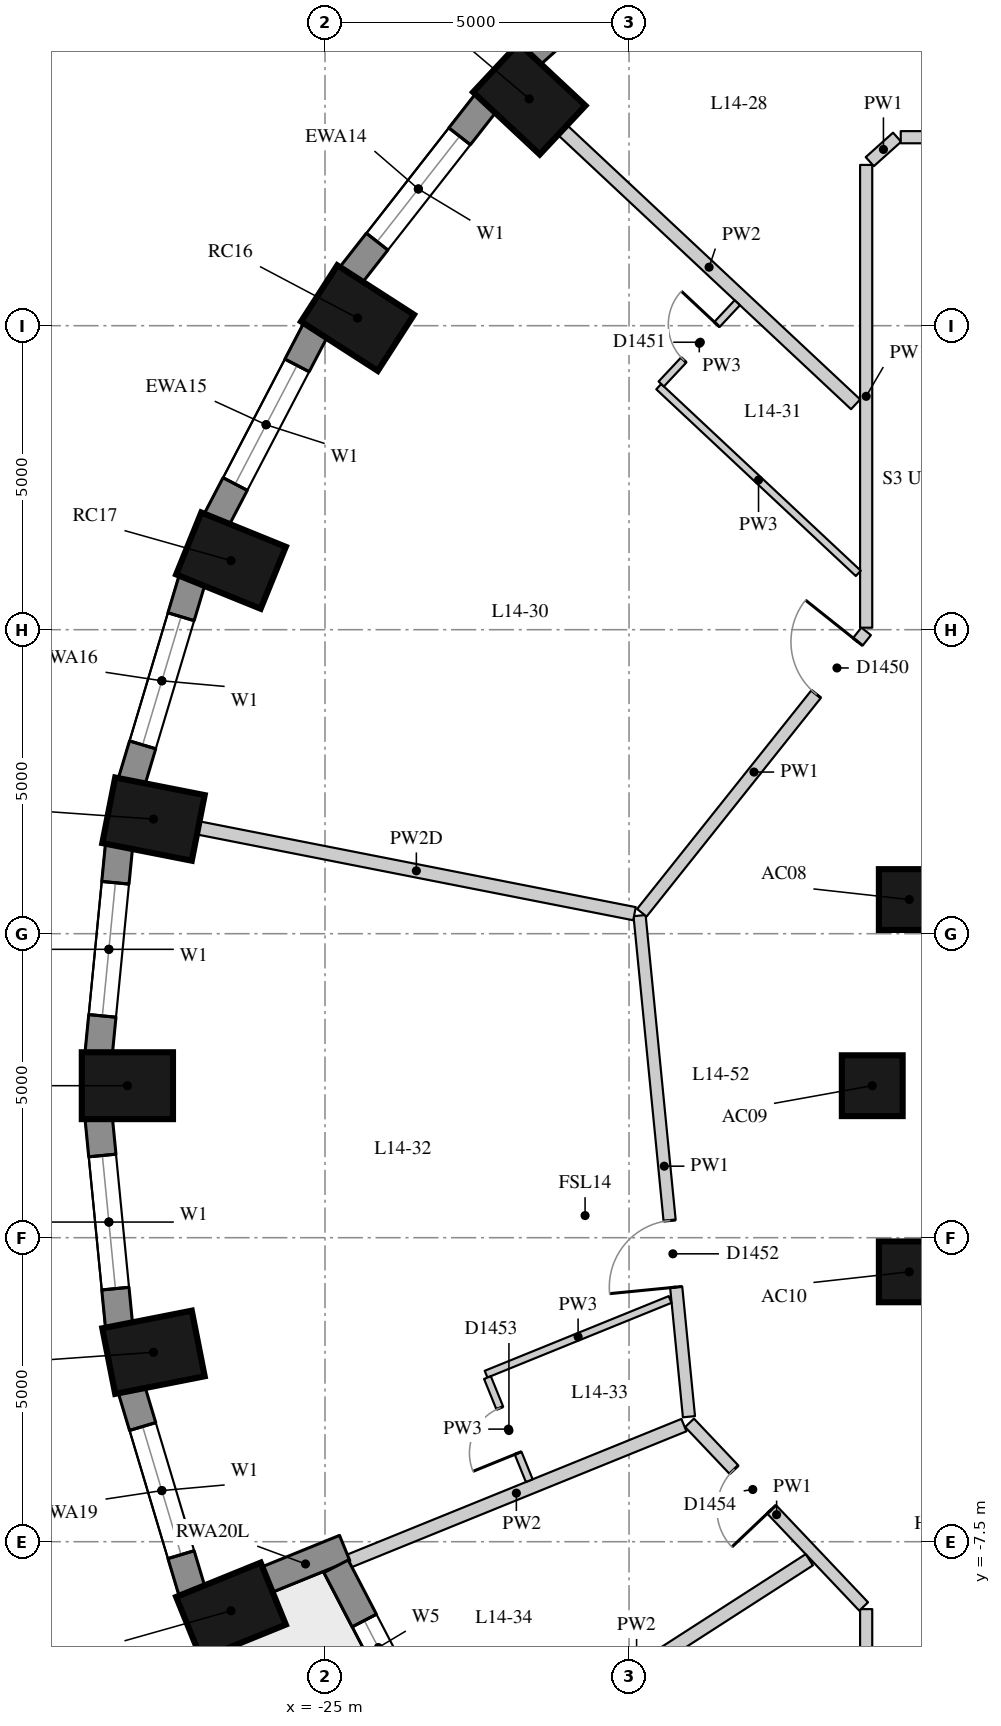
"""IFC4 building model, lengths in metres.
Left out: names, types, materials, properties, quantities, classifications, styles, units other than length and angle.
Written with IfcOpenShell. Run it as: python <this file> out.ifc"""

import sys

from ifc_helpers import new_model, si_unit, direction, frame, frame_2d, origin, origin_2d, place, context, subcontext, project, spatial, rectangle, extrude, element, fill, save


model = new_model("IFC4")
c1 = context("Model", 3, precision=1e-05, world=origin(), true_north=direction((0.0, 1.0)))
c2 = subcontext(c1, "Body", "Model", "MODEL_VIEW")
j1 = project(units=[si_unit("LENGTHUNIT", "METRE"), si_unit("PLANEANGLEUNIT", "RADIAN")], contexts=[c1])
p1 = place(None, origin())
s1 = spatial("IfcSite", under=j1, at=p1, CompositionType="ELEMENT")
p2 = place(p1, origin())
s2 = spatial("IfcBuilding", under=s1, at=p2, CompositionType="ELEMENT")
p3 = place(p2, frame((0.0, 0.0, 54.7)))
s3 = spatial("IfcBuildingStorey", under=s2, at=p3, CompositionType="ELEMENT", Elevation=54.7)
for number, where, z_axis, x_axis in (
    (1, (-21.641, 16.23, 0.0), (0.0, 0.0, 1.0), (-0.73, 0.683, 0.0)),
    (2, (-24.465, 12.625, 0.0), (0.0, 0.0, 1.0), (-0.841, 0.541, 0.0)),
    (3, (-26.546, 8.636, 0.0), (0.0, 0.0, 1.0), (-0.927, 0.376, 0.0)),
    (4, (-27.821, 4.385, 0.0), (0.0, 0.0, 1.0), (-0.981, 0.193, 0.0)),
    (5, (-28.25, 0.0, 0.0), (0.0, 0.0, 1.0), (-1.0, 0.0, 0.0)),
    (6, (-27.821, -4.385, 0.0), (0.0, 0.0, 1.0), (-0.981, -0.193, 0.0)),
    (7, (-26.546, -8.636, 0.0), (0.0, 0.0, 1.0), (-0.927, -0.376, 0.0)),
):
    element("IfcColumn", number, at=place(p3, frame(where, z_axis=z_axis, x_axis=x_axis)), inside=s3, PredefinedType="COLUMN", context=c2, shape_type="SweptSolid", body=[
        extrude(rectangle(XDim=1.5, YDim=1.1, at=origin_2d()), origin(), (0.0, 0.0, 1.0), 3.3),
    ])
for number, where, z_axis, x_axis in (
    (8, (-15.391, 3.062, 0.0), (0.0, 0.0, 1.0), (1.0, 0.0, 0.0)),
    (9, (-16.0, 0.0, 0.0), (0.0, 0.0, 1.0), (1.0, 0.0, 0.0)),
    (10, (-15.391, -3.062, 0.0), (0.0, 0.0, 1.0), (1.0, 0.0, 0.0)),
):
    element("IfcColumn", number, at=place(p3, frame(where, z_axis=z_axis, x_axis=x_axis)), inside=s3, PredefinedType="COLUMN", context=c2, shape_type="SweptSolid", body=[
        extrude(rectangle(XDim=1.0, YDim=1.0, at=origin_2d()), origin(), (0.0, 0.0, 1.0), 3.3),
    ])
p4 = place(p3, frame((-18.871, 19.407, 0.0), z_axis=(0.0, 0.0, 1.0), x_axis=(-0.745526233716, -0.66647628228, 0.0)))
e11 = element("IfcWall", 11, at=p4, inside=s3, PredefinedType="SOLIDWALL", context=c2, shape_type="SweptSolid", body=[
    extrude(rectangle(XDim=3.697, YDim=0.45, at=frame_2d((1.848, 0.0))), origin(), (0.0, 0.0, 1.0), 3.02),
])
p5 = place(p4, frame((0.749, 0.0, 0.4)))
e12 = element("IfcOpeningElement", 12, at=p5, cuts=e11, PredefinedType="OPENING", context=c2, shape_type="SweptSolid", body=[
    extrude(rectangle(XDim=2.2, YDim=1.75, at=frame_2d((1.1, 0.875))), frame((0.0, 0.235, 0.0), z_axis=(0.0, -1.0, 0.0), x_axis=(1.0, 0.0, 0.0)), (0.0, 0.0, 1.0), 0.47),
])
p6 = place(p3, frame((-22.352, 16.17, 0.0), z_axis=(0.0, 0.0, 1.0), x_axis=(-0.616661975264, -0.787228053529, 0.0)))
e13 = element("IfcWall", 13, at=p6, inside=s3, PredefinedType="SOLIDWALL", context=c2, shape_type="SweptSolid", body=[
    extrude(rectangle(XDim=3.61, YDim=0.45, at=frame_2d((1.805, 0.0))), origin(), (0.0, 0.0, 1.0), 3.02),
])
p7 = place(p6, frame((0.705, 0.0, 0.4)))
e14 = element("IfcOpeningElement", 14, at=p7, cuts=e13, PredefinedType="OPENING", context=c2, shape_type="SweptSolid", body=[
    extrude(rectangle(XDim=2.2, YDim=1.75, at=frame_2d((1.1, 0.875))), frame((0.0, 0.235, 0.0), z_axis=(0.0, -1.0, 0.0), x_axis=(1.0, 0.0, 0.0)), (0.0, 0.0, 1.0), 0.47),
])
p8 = place(p3, frame((-25.152, 12.437, 0.0), z_axis=(0.0, 0.0, 1.0), x_axis=(-0.462492775226, -0.886623050041, 0.0)))
e15 = element("IfcWall", 15, at=p8, inside=s3, PredefinedType="SOLIDWALL", context=c2, shape_type="SweptSolid", body=[
    extrude(rectangle(XDim=3.532, YDim=0.45, at=frame_2d((1.766, 0.0))), origin(), (0.0, 0.0, 1.0), 3.02),
])
p9 = place(p8, frame((0.666, 0.0, 0.4)))
e16 = element("IfcOpeningElement", 16, at=p9, cuts=e15, PredefinedType="OPENING", context=c2, shape_type="SweptSolid", body=[
    extrude(rectangle(XDim=2.2, YDim=1.75, at=frame_2d((1.1, 0.875))), frame((0.0, 0.235, 0.0), z_axis=(0.0, -1.0, 0.0), x_axis=(1.0, 0.0, 0.0)), (0.0, 0.0, 1.0), 0.47),
])
p10 = place(p3, frame((-27.185, 8.323, 0.0), z_axis=(0.0, 0.0, 1.0), x_axis=(-0.287064133733, -0.957911364963, 0.0)))
e17 = element("IfcWall", 17, at=p10, inside=s3, PredefinedType="SOLIDWALL", context=c2, shape_type="SweptSolid", body=[
    extrude(rectangle(XDim=3.473, YDim=0.45, at=frame_2d((1.737, 0.0))), origin(), (0.0, 0.0, 1.0), 3.02),
])
p11 = place(p10, frame((0.637, 0.0, 0.4)))
e18 = element("IfcOpeningElement", 18, at=p11, cuts=e17, PredefinedType="OPENING", context=c2, shape_type="SweptSolid", body=[
    extrude(rectangle(XDim=2.2, YDim=1.75, at=frame_2d((1.1, 0.875))), frame((0.0, 0.235, 0.0), z_axis=(0.0, -1.0, 0.0), x_axis=(1.0, 0.0, 0.0)), (0.0, 0.0, 1.0), 0.47),
])
p12 = place(p3, frame((-28.387, 3.956, 0.0), z_axis=(0.0, 0.0, 1.0), x_axis=(-0.097389581596, -0.995246336038, 0.0)))
e19 = element("IfcWall", 19, at=p12, inside=s3, PredefinedType="SOLIDWALL", context=c2, shape_type="SweptSolid", body=[
    extrude(rectangle(XDim=3.442, YDim=0.45, at=frame_2d((1.721, 0.0))), origin(), (0.0, 0.0, 1.0), 3.02),
])
p13 = place(p12, frame((0.621, 0.0, 0.4)))
e20 = element("IfcOpeningElement", 20, at=p13, cuts=e19, PredefinedType="OPENING", context=c2, shape_type="SweptSolid", body=[
    extrude(rectangle(XDim=2.2, YDim=1.75, at=frame_2d((1.1, 0.875))), frame((0.0, 0.235, 0.0), z_axis=(0.0, -1.0, 0.0), x_axis=(1.0, 0.0, 0.0)), (0.0, 0.0, 1.0), 0.47),
])
p14 = place(p3, frame((-28.722, -0.53, 0.0), z_axis=(0.0, 0.0, 1.0), x_axis=(0.097389581596, -0.995246336038, 0.0)))
e21 = element("IfcWall", 21, at=p14, inside=s3, PredefinedType="SOLIDWALL", context=c2, shape_type="SweptSolid", body=[
    extrude(rectangle(XDim=3.442, YDim=0.45, at=frame_2d((1.721, 0.0))), origin(), (0.0, 0.0, 1.0), 3.02),
])
p15 = place(p14, frame((0.621, 0.0, 0.4)))
e22 = element("IfcOpeningElement", 22, at=p15, cuts=e21, PredefinedType="OPENING", context=c2, shape_type="SweptSolid", body=[
    extrude(rectangle(XDim=2.2, YDim=1.75, at=frame_2d((1.1, 0.875))), frame((0.0, 0.235, 0.0), z_axis=(0.0, -1.0, 0.0), x_axis=(1.0, 0.0, 0.0)), (0.0, 0.0, 1.0), 0.47),
])
p16 = place(p3, frame((-28.182, -4.996, 0.0), z_axis=(0.0, 0.0, 1.0), x_axis=(0.287064133733, -0.957911364963, 0.0)))
e23 = element("IfcWall", 23, at=p16, inside=s3, PredefinedType="SOLIDWALL", context=c2, shape_type="SweptSolid", body=[
    extrude(rectangle(XDim=3.473, YDim=0.45, at=frame_2d((1.737, 0.0))), origin(), (0.0, 0.0, 1.0), 3.02),
])
p17 = place(p16, frame((0.637, 0.0, 0.4)))
e24 = element("IfcOpeningElement", 24, at=p17, cuts=e23, PredefinedType="OPENING", context=c2, shape_type="SweptSolid", body=[
    extrude(rectangle(XDim=2.2, YDim=1.75, at=frame_2d((1.1, 0.875))), frame((0.0, 0.235, 0.0), z_axis=(0.0, -1.0, 0.0), x_axis=(1.0, 0.0, 0.0)), (0.0, 0.0, 1.0), 0.47),
])
p18 = place(p3, frame((-25.965, -8.127, 0.0), z_axis=(0.0, 0.0, 1.0), x_axis=(0.926575599743, 0.376108572039, 0.0)))
e25 = element("IfcWall", 25, at=p18, inside=s3, PredefinedType="SOLIDWALL", context=c2, shape_type="SweptSolid", body=[
    extrude(rectangle(XDim=1.39, YDim=0.45, at=frame_2d((0.695, 0.0))), origin(), (0.0, 0.0, 1.0), 3.02),
])
p19 = place(p3, frame((-24.818, -7.905, 0.0), z_axis=(0.0, 0.0, 1.0), x_axis=(0.461517123562, -0.887131300687, 0.0)))
e26 = element("IfcWall", 26, at=p19, inside=s3, PredefinedType="SOLIDWALL", context=c2, shape_type="SweptSolid", body=[
    extrude(rectangle(XDim=4.162, YDim=0.45, at=frame_2d((2.081, 0.0))), origin(), (0.0, 0.0, 1.0), 3.02),
])
p20 = place(p19, frame((1.006, 0.0, 0.4)))
e27 = element("IfcOpeningElement", 27, at=p20, cuts=e26, PredefinedType="OPENING", context=c2, shape_type="SweptSolid", body=[
    extrude(rectangle(XDim=1.0, YDim=1.75, at=frame_2d((0.5, 0.875))), frame((0.0, 0.235, 0.0), z_axis=(0.0, -1.0, 0.0), x_axis=(1.0, 0.0, 0.0)), (0.0, 0.0, 1.0), 0.47),
])
p21 = place(p19, frame((2.156, 0.0, 0.0)))
e28 = element("IfcOpeningElement", 28, at=p21, cuts=e26, PredefinedType="OPENING", context=c2, shape_type="SweptSolid", body=[
    extrude(rectangle(XDim=1.0, YDim=2.15, at=frame_2d((0.5, 1.075))), frame((0.0, 0.235, 0.0), z_axis=(0.0, -1.0, 0.0), x_axis=(1.0, 0.0, 0.0)), (0.0, 0.0, 1.0), 0.47),
])
p22 = place(p3, frame((-16.1, -11.853, 0.0), z_axis=(0.0, 0.0, 1.0), x_axis=(0.0, 1.0, 0.0)))
e29 = element("IfcWall", 29, at=p22, inside=s3, PredefinedType="PARTITIONING", context=c2, shape_type="SweptSolid", body=[
    extrude(rectangle(XDim=3.244, YDim=0.2, at=frame_2d((1.622, 0.0))), origin(), (0.0, 0.0, 1.0), 3.02),
])
p23 = place(p22, frame((0.22, 0.0, 0.0)))
e30 = element("IfcOpeningElement", 30, at=p23, cuts=e29, PredefinedType="OPENING", context=c2, shape_type="SweptSolid", body=[
    extrude(rectangle(XDim=1.1, YDim=2.1, at=frame_2d((0.55, 1.05))), frame((0.0, 0.11, 0.0), z_axis=(0.0, -1.0, 0.0), x_axis=(1.0, 0.0, 0.0)), (0.0, 0.0, 1.0), 0.22),
])
p24 = place(p3, frame((-16.141, -8.566, 0.0), z_axis=(0.0, 0.0, 1.0), x_axis=(-0.687938220375, 0.725769250483, 0.0)))
e31 = element("IfcWall", 31, at=p24, inside=s3, PredefinedType="PARTITIONING", context=c2, shape_type="SweptSolid", body=[
    extrude(rectangle(XDim=4.162, YDim=0.2, at=frame_2d((2.081, 0.0))), origin(), (0.0, 0.0, 1.0), 3.02),
])
p25 = place(p24, frame((2.201, 0.0, 0.0)))
e32 = element("IfcOpeningElement", 32, at=p25, cuts=e31, PredefinedType="OPENING", context=c2, shape_type="SweptSolid", body=[
    extrude(rectangle(XDim=0.9, YDim=2.1, at=frame_2d((0.45, 1.05))), frame((0.0, 0.11, 0.0), z_axis=(0.0, -1.0, 0.0), x_axis=(1.0, 0.0, 0.0)), (0.0, 0.0, 1.0), 0.22),
])
p26 = place(p3, frame((-19.014, -5.445, 0.0), z_axis=(0.0, 0.0, 1.0), x_axis=(-0.098076369896, 0.995178891289, 0.0)))
e33 = element("IfcWall", 33, at=p26, inside=s3, PredefinedType="PARTITIONING", context=c2, shape_type="SweptSolid", body=[
    extrude(rectangle(XDim=8.282, YDim=0.2, at=frame_2d((4.141, 0.0))), origin(), (0.0, 0.0, 1.0), 3.02),
])
p27 = place(p26, frame((2.142, 0.0, 0.0)))
e34 = element("IfcOpeningElement", 34, at=p27, cuts=e33, PredefinedType="OPENING", context=c2, shape_type="SweptSolid", body=[
    extrude(rectangle(XDim=1.1, YDim=2.1, at=frame_2d((0.55, 1.05))), frame((0.0, 0.11, 0.0), z_axis=(0.0, -1.0, 0.0), x_axis=(1.0, 0.0, 0.0)), (0.0, 0.0, 1.0), 0.22),
])
p28 = place(p3, frame((-19.789, 2.844, 0.0), z_axis=(0.0, 0.0, 1.0), x_axis=(0.623300670662, 0.781982272147, 0.0)))
e35 = element("IfcWall", 35, at=p28, inside=s3, PredefinedType="PARTITIONING", context=c2, shape_type="SweptSolid", body=[
    extrude(rectangle(XDim=5.919, YDim=0.2, at=frame_2d((2.959, 0.0))), origin(), (0.0, 0.0, 1.0), 3.02),
])
p29 = place(p28, frame((4.599, 0.0, 0.0)))
e36 = element("IfcOpeningElement", 36, at=p29, cuts=e35, PredefinedType="OPENING", context=c2, shape_type="SweptSolid", body=[
    extrude(rectangle(XDim=1.1, YDim=2.1, at=frame_2d((0.55, 1.05))), frame((0.0, 0.11, 0.0), z_axis=(0.0, -1.0, 0.0), x_axis=(1.0, 0.0, 0.0)), (0.0, 0.0, 1.0), 0.22),
])
p30 = place(p3, frame((-16.1, 7.533, 0.0), z_axis=(0.0, 0.0, 1.0), x_axis=(0.0, 1.0, 0.0)))
e37 = element("IfcWall", 37, at=p30, inside=s3, PredefinedType="PARTITIONING", context=c2, shape_type="SweptSolid", body=[
    extrude(rectangle(XDim=7.611, YDim=0.2, at=frame_2d((3.806, 0.0))), origin(), (0.0, 0.0, 1.0), 3.02),
])
p31 = place(p3, frame((-16.041, 15.198, 0.0), z_axis=(0.0, 0.0, 1.0), x_axis=(0.744722115519, 0.667374685359, 0.0)))
e38 = element("IfcWall", 38, at=p31, inside=s3, PredefinedType="PARTITIONING", context=c2, shape_type="SweptSolid", body=[
    extrude(rectangle(XDim=0.603, YDim=0.2, at=frame_2d((0.301, 0.0))), origin(), (0.0, 0.0, 1.0), 3.02),
])
p32 = place(p3, frame((-15.531, 15.6, 0.0), z_axis=(0.0, 0.0, 1.0), x_axis=(1.0, 0.0, 0.0)))
e39 = element("IfcWall", 39, at=p32, inside=s3, PredefinedType="PARTITIONING", context=c2, shape_type="SweptSolid", body=[
    extrude(rectangle(XDim=7.632, YDim=0.2, at=frame_2d((3.816, 0.0))), origin(), (0.0, 0.0, 1.0), 3.02),
])
p33 = place(p32, frame((5.283, 0.0, 0.0)))
e40 = element("IfcOpeningElement", 40, at=p33, cuts=e39, PredefinedType="OPENING", context=c2, shape_type="SweptSolid", body=[
    extrude(rectangle(XDim=1.0, YDim=2.1, at=frame_2d((0.5, 1.05))), frame((0.0, 0.11, 0.0), z_axis=(0.0, -1.0, 0.0), x_axis=(1.0, 0.0, 0.0)), (0.0, 0.0, 1.0), 0.22),
])
p34 = place(p32, frame((0.451, 0.0, 0.0)))
e41 = element("IfcOpeningElement", 41, at=p34, cuts=e39, PredefinedType="OPENING", context=c2, shape_type="SweptSolid", body=[
    extrude(rectangle(XDim=1.1, YDim=2.1, at=frame_2d((0.55, 1.05))), frame((0.0, 0.11, 0.0), z_axis=(0.0, -1.0, 0.0), x_axis=(1.0, 0.0, 0.0)), (0.0, 0.0, 1.0), 0.22),
])
p35 = place(p3, frame((-21.093, 15.718, 0.0), z_axis=(0.0, 0.0, 1.0), x_axis=(0.73009284205, -0.683347965525, 0.0)))
e42 = element("IfcWall", 42, at=p35, inside=s3, PredefinedType="PARTITIONING", context=c2, shape_type="SweptSolid", body=[
    extrude(rectangle(XDim=6.602, YDim=0.22, at=frame_2d((3.301, 0.0))), origin(), (0.0, 0.0, 1.0), 3.02),
])
p36 = place(p3, frame((-27.085, 4.24, 0.0), z_axis=(0.0, 0.0, 1.0), x_axis=(0.981202333999, -0.192981811981, 0.0)))
e43 = element("IfcWall", 43, at=p36, inside=s3, PredefinedType="PARTITIONING", context=c2, shape_type="SweptSolid", body=[
    extrude(rectangle(XDim=7.312, YDim=0.22, at=frame_2d((3.656, 0.0))), origin(), (0.0, 0.0, 1.0), 2.47),
])
p37 = place(p3, frame((-24.609, -7.82, 0.0), z_axis=(0.0, 0.0, 1.0), x_axis=(0.926562262773, 0.376141427131, 0.0)))
e44 = element("IfcWall", 44, at=p37, inside=s3, PredefinedType="PARTITIONING", context=c2, shape_type="SweptSolid", body=[
    extrude(rectangle(XDim=5.948, YDim=0.22, at=frame_2d((2.974, 0.0))), origin(), (0.0, 0.0, 1.0), 3.02),
])
p38 = place(p3, frame((-22.717, -11.456, 0.0), z_axis=(0.0, 0.0, 1.0), x_axis=(0.840775666807, 0.541383669965, 0.0)))
e45 = element("IfcWall", 45, at=p38, inside=s3, PredefinedType="PARTITIONING", context=c2, shape_type="SweptSolid", body=[
    extrude(rectangle(XDim=6.759, YDim=0.22, at=frame_2d((3.379, 0.0))), origin(), (0.0, 0.0, 1.0), 3.02),
])
p39 = place(p3, frame((-16.229, 8.426, 0.0), z_axis=(0.0, 0.0, 1.0), x_axis=(-0.730077325201, 0.683364543438, 0.0)))
e46 = element("IfcWall", 46, at=p39, inside=s3, PredefinedType="PARTITIONING", context=c2, shape_type="SweptSolid", body=[
    extrude(rectangle(XDim=4.495, YDim=0.12, at=frame_2d((2.247, 0.0))), origin(), (0.0, 0.0, 1.0), 3.02),
])
p40 = place(p3, frame((-19.324, -3.516, 0.0), z_axis=(0.0, 0.0, 1.0), x_axis=(-0.926573216048, -0.376114444421, 0.0)))
e47 = element("IfcWall", 47, at=p40, inside=s3, PredefinedType="PARTITIONING", context=c2, shape_type="SweptSolid", body=[
    extrude(rectangle(XDim=3.267, YDim=0.12, at=frame_2d((1.634, 0.0))), origin(), (0.0, 0.0, 1.0), 3.02),
])
p41 = place(p3, frame((-19.47, 11.542, 0.0), z_axis=(0.0, 0.0, 1.0), x_axis=(0.683306289544, 0.730131847456, 0.0)))
e48 = element("IfcWall", 48, at=p41, inside=s3, PredefinedType="PARTITIONING", context=c2, shape_type="SweptSolid", body=[
    extrude(rectangle(XDim=1.83, YDim=0.12, at=frame_2d((0.915, 0.0))), origin(), (0.0, 0.0, 1.0), 3.02),
])
p42 = place(p41, frame((0.54, 0.0, 0.0)))
e49 = element("IfcOpeningElement", 49, at=p42, cuts=e48, PredefinedType="OPENING", context=c2, shape_type="SweptSolid", body=[
    extrude(rectangle(XDim=0.8, YDim=2.1, at=frame_2d((0.4, 1.05))), frame((0.0, 0.07, 0.0), z_axis=(0.0, -1.0, 0.0), x_axis=(1.0, 0.0, 0.0)), (0.0, 0.0, 1.0), 0.14),
])
p43 = place(p3, frame((-22.329, -4.801, 0.0), z_axis=(0.0, 0.0, 1.0), x_axis=(0.376101474088, -0.926578480858, 0.0)))
e50 = element("IfcWall", 50, at=p43, inside=s3, PredefinedType="PARTITIONING", context=c2, shape_type="SweptSolid", body=[
    extrude(rectangle(XDim=1.83, YDim=0.12, at=frame_2d((0.915, 0.0))), origin(), (0.0, 0.0, 1.0), 3.02),
])
p44 = place(p43, frame((0.54, 0.0, 0.0)))
e51 = element("IfcOpeningElement", 51, at=p44, cuts=e50, PredefinedType="OPENING", context=c2, shape_type="SweptSolid", body=[
    extrude(rectangle(XDim=0.8, YDim=2.1, at=frame_2d((0.4, 1.05))), frame((0.0, 0.07, 0.0), z_axis=(0.0, -1.0, 0.0), x_axis=(1.0, 0.0, 0.0)), (0.0, 0.0, 1.0), 0.14),
])
p45 = place(p7, origin())
e52 = element("IfcWindow", 52, at=p45, inside=s3, PartitioningType="SINGLE_PANEL", PredefinedType="WINDOW", context=c2, shape_type="SweptSolid", body=[
    extrude(rectangle(XDim=2.2, YDim=1.75, at=frame_2d((1.1, 0.875))), frame((0.0, 0.035, 0.0), z_axis=(0.0, -1.0, 0.0), x_axis=(1.0, 0.0, 0.0)), (0.0, 0.0, 1.0), 0.06),
])
fill(e14, e52)
p46 = place(p9, origin())
e53 = element("IfcWindow", 53, at=p46, inside=s3, PartitioningType="SINGLE_PANEL", PredefinedType="WINDOW", context=c2, shape_type="SweptSolid", body=[
    extrude(rectangle(XDim=2.2, YDim=1.75, at=frame_2d((1.1, 0.875))), frame((0.0, 0.035, 0.0), z_axis=(0.0, -1.0, 0.0), x_axis=(1.0, 0.0, 0.0)), (0.0, 0.0, 1.0), 0.06),
])
fill(e16, e53)
p47 = place(p11, origin())
e54 = element("IfcWindow", 54, at=p47, inside=s3, PartitioningType="SINGLE_PANEL", PredefinedType="WINDOW", context=c2, shape_type="SweptSolid", body=[
    extrude(rectangle(XDim=2.2, YDim=1.75, at=frame_2d((1.1, 0.875))), frame((0.0, 0.035, 0.0), z_axis=(0.0, -1.0, 0.0), x_axis=(1.0, 0.0, 0.0)), (0.0, 0.0, 1.0), 0.06),
])
fill(e18, e54)
p48 = place(p13, origin())
e55 = element("IfcWindow", 55, at=p48, inside=s3, PartitioningType="SINGLE_PANEL", PredefinedType="WINDOW", context=c2, shape_type="SweptSolid", body=[
    extrude(rectangle(XDim=2.2, YDim=1.75, at=frame_2d((1.1, 0.875))), frame((0.0, 0.035, 0.0), z_axis=(0.0, -1.0, 0.0), x_axis=(1.0, 0.0, 0.0)), (0.0, 0.0, 1.0), 0.06),
])
fill(e20, e55)
p49 = place(p15, origin())
e56 = element("IfcWindow", 56, at=p49, inside=s3, PartitioningType="SINGLE_PANEL", PredefinedType="WINDOW", context=c2, shape_type="SweptSolid", body=[
    extrude(rectangle(XDim=2.2, YDim=1.75, at=frame_2d((1.1, 0.875))), frame((0.0, 0.035, 0.0), z_axis=(0.0, -1.0, 0.0), x_axis=(1.0, 0.0, 0.0)), (0.0, 0.0, 1.0), 0.06),
])
fill(e22, e56)
p50 = place(p17, origin())
e57 = element("IfcWindow", 57, at=p50, inside=s3, PartitioningType="SINGLE_PANEL", PredefinedType="WINDOW", context=c2, shape_type="SweptSolid", body=[
    extrude(rectangle(XDim=2.2, YDim=1.75, at=frame_2d((1.1, 0.875))), frame((0.0, 0.035, 0.0), z_axis=(0.0, -1.0, 0.0), x_axis=(1.0, 0.0, 0.0)), (0.0, 0.0, 1.0), 0.06),
])
fill(e24, e57)
p51 = place(p20, origin())
e58 = element("IfcWindow", 58, at=p51, inside=s3, PartitioningType="SINGLE_PANEL", PredefinedType="WINDOW", context=c2, shape_type="SweptSolid", body=[
    extrude(rectangle(XDim=1.0, YDim=1.75, at=frame_2d((0.5, 0.875))), frame((0.0, 0.035, 0.0), z_axis=(0.0, -1.0, 0.0), x_axis=(1.0, 0.0, 0.0)), (0.0, 0.0, 1.0), 0.06),
])
fill(e27, e58)
p52 = place(p29, origin())
e59 = element("IfcDoor", 59, at=p52, inside=s3, OperationType="SINGLE_SWING_RIGHT", PredefinedType="DOOR", context=c2, shape_type="SweptSolid", body=[
    extrude(rectangle(XDim=1.1, YDim=2.1, at=frame_2d((0.55, 1.05))), frame((0.0, 0.025, 0.0), z_axis=(0.0, -1.0, 0.0), x_axis=(1.0, 0.0, 0.0)), (0.0, 0.0, 1.0), 0.05),
])
fill(e36, e59)
p53 = place(p42, origin())
e60 = element("IfcDoor", 60, at=p53, inside=s3, OperationType="SINGLE_SWING_RIGHT", PredefinedType="DOOR", context=c2, shape_type="SweptSolid", body=[
    extrude(rectangle(XDim=0.8, YDim=2.1, at=frame_2d((0.4, 1.05))), frame((0.0, 0.025, 0.0), z_axis=(0.0, -1.0, 0.0), x_axis=(1.0, 0.0, 0.0)), (0.0, 0.0, 1.0), 0.05),
])
fill(e49, e60)
p54 = place(p27, origin())
e61 = element("IfcDoor", 61, at=p54, inside=s3, OperationType="SINGLE_SWING_LEFT", PredefinedType="DOOR", context=c2, shape_type="SweptSolid", body=[
    extrude(rectangle(XDim=1.1, YDim=2.1, at=frame_2d((0.55, 1.05))), frame((0.0, 0.025, 0.0), z_axis=(0.0, -1.0, 0.0), x_axis=(1.0, 0.0, 0.0)), (0.0, 0.0, 1.0), 0.05),
])
fill(e34, e61)
p55 = place(p44, origin())
e62 = element("IfcDoor", 62, at=p55, inside=s3, OperationType="SINGLE_SWING_LEFT", PredefinedType="DOOR", context=c2, shape_type="SweptSolid", body=[
    extrude(rectangle(XDim=0.8, YDim=2.1, at=frame_2d((0.4, 1.05))), frame((0.0, 0.025, 0.0), z_axis=(0.0, -1.0, 0.0), x_axis=(1.0, 0.0, 0.0)), (0.0, 0.0, 1.0), 0.05),
])
fill(e51, e62)
p56 = place(p25, origin())
e63 = element("IfcDoor", 63, at=p56, inside=s3, OperationType="SINGLE_SWING_LEFT", PredefinedType="DOOR", context=c2, shape_type="SweptSolid", body=[
    extrude(rectangle(XDim=0.9, YDim=2.1, at=frame_2d((0.45, 1.05))), frame((0.0, 0.025, 0.0), z_axis=(0.0, -1.0, 0.0), x_axis=(1.0, 0.0, 0.0)), (0.0, 0.0, 1.0), 0.05),
])
fill(e32, e63)
save(model, sys.argv[1])
